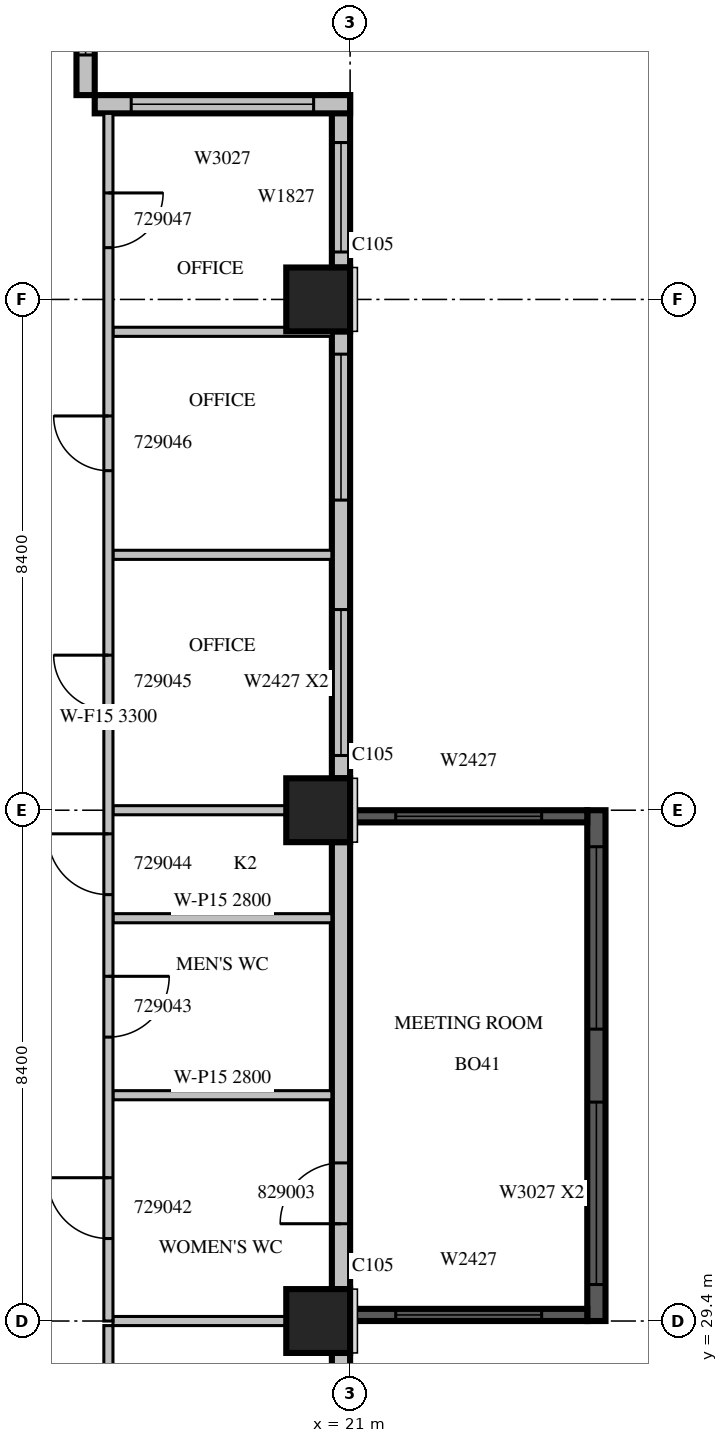
"""IFC4 building model, lengths in metres.
Left out: names, types, materials, properties, quantities, classifications, styles, units other than length and angle.
Written with IfcOpenShell. Run it as: python <this file> out.ifc"""

import sys

from ifc_helpers import new_model, si_unit, direction, frame, frame_2d, origin, origin_2d, place, context, subcontext, project, spatial, rectangle, extrude, source, transform, mapped, element, fill, save


model = new_model("IFC4")
c1 = context("Model", 3, precision=1e-05, world=origin(), true_north=direction((0.0, 1.0)))
c2 = subcontext(c1, "Body", "Model", "MODEL_VIEW")
j1 = project(units=[si_unit("LENGTHUNIT", "METRE"), si_unit("PLANEANGLEUNIT", "RADIAN")], contexts=[c1])
p1 = place(None, origin())
s1 = spatial("IfcSite", under=j1, at=p1, CompositionType="ELEMENT")
p2 = place(p1, origin())
s2 = spatial("IfcBuilding", under=s1, at=p2, CompositionType="ELEMENT")
p3 = place(p2, frame((0.0, 0.0, 132.9)))
s3 = spatial("IfcBuildingStorey", under=s2, at=p3, CompositionType="ELEMENT", Elevation=132.9)
m1 = source(origin(), c2, "Body", "SweptSolid", [
    extrude(rectangle(XDim=1.05, YDim=1.05, at=origin_2d()), origin(), (0.0, 0.0, 1.0), 4.2),
])
for number, where, z_axis, x_axis in (
    (1, (20.475, 29.4, 0.0), (0.0, 0.0, 1.0), (1.0, 0.0, 0.0)),
    (2, (20.475, 37.8, 0.0), (0.0, 0.0, 1.0), (1.0, 0.0, 0.0)),
    (3, (20.475, 46.2, 0.0), (0.0, 0.0, 1.0), (1.0, 0.0, 0.0)),
):
    element("IfcColumn", number, at=place(p3, frame(where, z_axis=z_axis, x_axis=x_axis)), inside=s3, PredefinedType="COLUMN", context=c2, shape_type="MappedRepresentation", body=[
        mapped(m1, transform((0.0, 0.0, 0.0), scale=1.0)),
    ])
m2 = source(origin(), c2, "Body", "SweptSolid", [
    extrude(rectangle(XDim=6.875, YDim=0.3, at=frame_2d((3.438, 0.0))), origin(), (0.0, 0.0, 1.0), 3.8),
])
p4 = place(p3, frame((20.85, 22.0, 0.0), z_axis=(0.0, 0.0, 1.0), x_axis=(0.0, 1.0, 0.0)))
e4 = element("IfcWall", 4, at=p4, inside=s3, PredefinedType="STANDARD", context=c2, shape_type="MappedRepresentation", body=[
    mapped(m2, transform((0.0, 0.0, 0.0), scale=1.0)),
])
m3 = source(origin(), c2, "Body", "SweptSolid", [
    extrude(rectangle(XDim=1.8, YDim=2.7, at=frame_2d((0.9, 1.35))), frame((0.0, 0.16, 0.0), z_axis=(0.0, -1.0, 0.0), x_axis=(1.0, 0.0, 0.0)), (0.0, 0.0, 1.0), 0.32),
])
p5 = place(p4, frame((0.2, 0.0, 0.6)))
e5 = element("IfcOpeningElement", 5, at=p5, cuts=e4, PredefinedType="OPENING", context=c2, shape_type="MappedRepresentation", body=[
    mapped(m3, transform((0.0, 0.0, 0.0), scale=1.0)),
])
p6 = place(p4, frame((4.537, 0.0, 0.6)))
e6 = element("IfcOpeningElement", 6, at=p6, cuts=e4, PredefinedType="OPENING", context=c2, shape_type="MappedRepresentation", body=[
    mapped(m3, transform((0.0, 0.0, 0.0), scale=1.0)),
])
m4 = source(origin(), c2, "Body", "SweptSolid", [
    extrude(rectangle(XDim=7.35, YDim=0.3, at=frame_2d((3.675, 0.0))), origin(), (0.0, 0.0, 1.0), 3.8),
])
p7 = place(p3, frame((20.85, 29.925, 0.0), z_axis=(0.0, 0.0, 1.0), x_axis=(0.0, 1.0, 0.0)))
e7 = element("IfcWall", 7, at=p7, inside=s3, PredefinedType="STANDARD", context=c2, shape_type="MappedRepresentation", body=[
    mapped(m4, transform((0.0, 0.0, 0.0), scale=1.0)),
])
m5 = source(origin(), c2, "Body", "SweptSolid", [
    extrude(rectangle(XDim=1.0, YDim=2.1, at=frame_2d((0.5, 1.05))), frame((0.0, 0.16, 0.0), z_axis=(0.0, -1.0, 0.0), x_axis=(1.0, 0.0, 0.0)), (0.0, 0.0, 1.0), 0.32),
])
p8 = place(p7, frame((1.075, 0.0, 0.0)))
e8 = element("IfcOpeningElement", 8, at=p8, cuts=e7, PredefinedType="OPENING", context=c2, shape_type="MappedRepresentation", body=[
    mapped(m5, transform((0.0, 0.0, 0.0), scale=1.0)),
])
p9 = place(p3, frame((20.85, 38.325, 0.0), z_axis=(0.0, 0.0, 1.0), x_axis=(0.0, 1.0, 0.0)))
e9 = element("IfcWall", 9, at=p9, inside=s3, PredefinedType="STANDARD", context=c2, shape_type="MappedRepresentation", body=[
    mapped(m4, transform((0.0, 0.0, 0.0), scale=1.0)),
])
m6 = source(origin(), c2, "Body", "SweptSolid", [
    extrude(rectangle(XDim=2.4, YDim=2.7, at=frame_2d((1.2, 1.35))), frame((0.0, 0.16, 0.0), z_axis=(0.0, -1.0, 0.0), x_axis=(1.0, 0.0, 0.0)), (0.0, 0.0, 1.0), 0.32),
])
p10 = place(p9, frame((0.375, 0.0, 0.6)))
e10 = element("IfcOpeningElement", 10, at=p10, cuts=e9, PredefinedType="OPENING", context=c2, shape_type="MappedRepresentation", body=[
    mapped(m6, transform((0.0, 0.0, 0.0), scale=1.0)),
])
p11 = place(p9, frame((4.575, 0.0, 0.6)))
e11 = element("IfcOpeningElement", 11, at=p11, cuts=e9, PredefinedType="OPENING", context=c2, shape_type="MappedRepresentation", body=[
    mapped(m6, transform((0.0, 0.0, 0.0), scale=1.0)),
])
m7 = source(origin(), c2, "Body", "SweptSolid", [
    extrude(rectangle(XDim=2.835, YDim=0.3, at=frame_2d((1.417, 0.0))), origin(), (0.0, 0.0, 1.0), 3.8),
])
p12 = place(p3, frame((20.85, 46.725, 0.0), z_axis=(0.0, 0.0, 1.0), x_axis=(0.0, 1.0, 0.0)))
e12 = element("IfcWall", 12, at=p12, inside=s3, PredefinedType="STANDARD", context=c2, shape_type="MappedRepresentation", body=[
    mapped(m7, transform((0.0, 0.0, 0.0), scale=1.0)),
])
p13 = place(p12, frame((0.255, 0.0, 0.6)))
e13 = element("IfcOpeningElement", 13, at=p13, cuts=e12, PredefinedType="OPENING", context=c2, shape_type="MappedRepresentation", body=[
    mapped(m3, transform((0.0, 0.0, 0.0), scale=1.0)),
])
m8 = source(origin(), c2, "Body", "SweptSolid", [
    extrude(rectangle(XDim=4.2, YDim=0.3, at=frame_2d((2.1, 0.0))), origin(), (0.0, 0.0, 1.0), 3.8),
])
p14 = place(p3, frame((21.0, 49.41, 0.0), z_axis=(0.0, 0.0, 1.0), x_axis=(-1.0, 0.0, 0.0)))
e14 = element("IfcWall", 14, at=p14, inside=s3, PredefinedType="STANDARD", context=c2, shape_type="MappedRepresentation", body=[
    mapped(m8, transform((0.0, 0.0, 0.0), scale=1.0)),
])
m9 = source(origin(), c2, "Body", "SweptSolid", [
    extrude(rectangle(XDim=3.0, YDim=2.7, at=frame_2d((1.5, 1.35))), frame((0.0, 0.16, 0.0), z_axis=(0.0, -1.0, 0.0), x_axis=(1.0, 0.0, 0.0)), (0.0, 0.0, 1.0), 0.32),
])
p15 = place(p14, frame((0.6, 0.0, 0.6)))
e15 = element("IfcOpeningElement", 15, at=p15, cuts=e14, PredefinedType="OPENING", context=c2, shape_type="MappedRepresentation", body=[
    mapped(m9, transform((0.0, 0.0, 0.0), scale=1.0)),
])
m10 = source(origin(), c2, "Body", "SweptSolid", [
    extrude(rectangle(XDim=2.52, YDim=0.3, at=frame_2d((1.26, 0.0))), origin(), (0.0, 0.0, 1.0), 3.8),
])
p16 = place(p3, frame((16.65, 49.56, 0.0), z_axis=(0.0, 0.0, 1.0), x_axis=(0.0, 1.0, 0.0)))
e16 = element("IfcWall", 16, at=p16, inside=s3, PredefinedType="STANDARD", context=c2, shape_type="MappedRepresentation", body=[
    mapped(m10, transform((0.0, 0.0, 0.0), scale=1.0)),
])
m11 = source(origin(), c2, "Body", "SweptSolid", [
    extrude(rectangle(XDim=1.2, YDim=2.7, at=frame_2d((0.6, 1.35))), frame((0.0, 0.16, 0.0), z_axis=(0.0, -1.0, 0.0), x_axis=(1.0, 0.0, 0.0)), (0.0, 0.0, 1.0), 0.32),
])
p17 = place(p16, frame((0.66, 0.0, 0.6)))
e17 = element("IfcOpeningElement", 17, at=p17, cuts=e16, PredefinedType="OPENING", context=c2, shape_type="MappedRepresentation", body=[
    mapped(m11, transform((0.0, 0.0, 0.0), scale=1.0)),
])
m12 = source(origin(), c2, "Body", "SweptSolid", [
    extrude(rectangle(XDim=8.4, YDim=0.3, at=frame_2d((4.2, 0.0))), origin(), (0.0, 0.0, 1.0), 3.79),
])
p18 = place(p3, frame((25.05, 29.4, 0.0), z_axis=(0.0, 0.0, 1.0), x_axis=(0.0, 1.0, 0.0)))
e18 = element("IfcWall", 18, at=p18, inside=s3, PredefinedType="SOLIDWALL", context=c2, shape_type="MappedRepresentation", body=[
    mapped(m12, transform((0.0, 0.0, 0.0), scale=1.0)),
])
p19 = place(p18, frame((0.6, 0.0, 0.6)))
e19 = element("IfcOpeningElement", 19, at=p19, cuts=e18, PredefinedType="OPENING", context=c2, shape_type="MappedRepresentation", body=[
    mapped(m9, transform((0.0, 0.0, 0.0), scale=1.0)),
])
p20 = place(p18, frame((4.8, 0.0, 0.6)))
e20 = element("IfcOpeningElement", 20, at=p20, cuts=e18, PredefinedType="OPENING", context=c2, shape_type="MappedRepresentation", body=[
    mapped(m9, transform((0.0, 0.0, 0.0), scale=1.0)),
])
m13 = source(origin(), c2, "Body", "SweptSolid", [
    extrude(rectangle(XDim=3.9, YDim=0.2, at=frame_2d((1.95, 0.0))), origin(), (0.0, 0.0, 1.0), 3.79),
])
p21 = place(p3, frame((21.0, 29.5, 0.0), z_axis=(0.0, 0.0, 1.0), x_axis=(1.0, 0.0, 0.0)))
e21 = element("IfcWall", 21, at=p21, inside=s3, PredefinedType="SOLIDWALL", context=c2, shape_type="MappedRepresentation", body=[
    mapped(m13, transform((0.0, 0.0, 0.0), scale=1.0)),
])
m14 = source(origin(), c2, "Body", "SweptSolid", [
    extrude(rectangle(XDim=2.4, YDim=2.7, at=frame_2d((1.2, 1.35))), frame((0.0, 0.11, 0.0), z_axis=(0.0, -1.0, 0.0), x_axis=(1.0, 0.0, 0.0)), (0.0, 0.0, 1.0), 0.22),
])
p22 = place(p21, frame((0.75, 0.0, 0.6)))
e22 = element("IfcOpeningElement", 22, at=p22, cuts=e21, PredefinedType="OPENING", context=c2, shape_type="MappedRepresentation", body=[
    mapped(m14, transform((0.0, 0.0, 0.0), scale=1.0)),
])
p23 = place(p3, frame((21.0, 37.7, 0.0), z_axis=(0.0, 0.0, 1.0), x_axis=(1.0, 0.0, 0.0)))
e23 = element("IfcWall", 23, at=p23, inside=s3, PredefinedType="SOLIDWALL", context=c2, shape_type="MappedRepresentation", body=[
    mapped(m13, transform((0.0, 0.0, 0.0), scale=1.0)),
])
p24 = place(p23, frame((0.75, 0.0, 0.6)))
e24 = element("IfcOpeningElement", 24, at=p24, cuts=e23, PredefinedType="OPENING", context=c2, shape_type="MappedRepresentation", body=[
    mapped(m14, transform((0.0, 0.0, 0.0), scale=1.0)),
])
m15 = source(origin(), c2, "Body", "SweptSolid", [
    extrude(rectangle(XDim=3.05, YDim=0.15, at=frame_2d((1.525, 0.0))), origin(), (0.0, 0.0, 1.0), 3.8),
])
p25 = place(p3, frame((17.025, 29.325, 0.0), z_axis=(0.0, 0.0, 1.0), x_axis=(0.0, -1.0, 0.0)))
e25 = element("IfcWall", 25, at=p25, inside=s3, PredefinedType="PARTITIONING", context=c2, shape_type="MappedRepresentation", body=[
    mapped(m15, transform((0.0, 0.0, 0.0), scale=1.0)),
])
m16 = source(origin(), c2, "Body", "SweptSolid", [
    extrude(rectangle(XDim=2.851, YDim=0.15, at=frame_2d((1.425, 0.0))), origin(), (0.0, 0.0, 1.0), 3.8),
])
p26 = place(p3, frame((19.951, 29.4, 0.0), z_axis=(0.0, 0.0, 1.0), x_axis=(-1.0, 0.0, 0.0)))
e26 = element("IfcWall", 26, at=p26, inside=s3, PredefinedType="PARTITIONING", context=c2, shape_type="MappedRepresentation", body=[
    mapped(m16, transform((0.0, 0.0, 0.0), scale=1.0)),
])
m17 = source(origin(), c2, "Body", "SweptSolid", [
    extrude(rectangle(XDim=3.6, YDim=0.15, at=frame_2d((1.8, 0.0))), origin(), (0.0, 0.0, 1.0), 2.8),
])
for number, where, z_axis, x_axis in (
    (27, (17.1, 33.113, 0.0), (0.0, 0.0, 1.0), (1.0, 0.0, 0.0)),
    (28, (17.1, 36.024, 0.0), (0.0, 0.0, 1.0), (1.0, 0.0, 0.0)),
):
    element("IfcWall", number, at=place(p3, frame(where, z_axis=z_axis, x_axis=x_axis)), inside=s3, PredefinedType="PARTITIONING", context=c2, shape_type="MappedRepresentation", body=[
        mapped(m17, transform((0.0, 0.0, 0.0), scale=1.0)),
    ])
m18 = source(origin(), c2, "Body", "SweptSolid", [
    extrude(rectangle(XDim=3.6, YDim=0.15, at=frame_2d((1.8, 0.0))), origin(), (0.0, 0.0, 1.0), 3.8),
])
p27 = place(p3, frame((17.1, 45.667, 0.0), z_axis=(0.0, 0.0, 1.0), x_axis=(1.0, 0.0, 0.0)))
e29 = element("IfcWall", 29, at=p27, inside=s3, PredefinedType="PARTITIONING", context=c2, shape_type="MappedRepresentation", body=[
    mapped(m18, transform((0.0, 0.0, 0.0), scale=1.0)),
])
p28 = place(p3, frame((19.951, 37.8, 0.0), z_axis=(0.0, 0.0, 1.0), x_axis=(-1.0, 0.0, 0.0)))
e30 = element("IfcWall", 30, at=p28, inside=s3, PredefinedType="PARTITIONING", context=c2, shape_type="MappedRepresentation", body=[
    mapped(m16, transform((0.0, 0.0, 0.0), scale=1.0)),
])
p29 = place(p3, frame((20.7, 42.0, 0.0), z_axis=(0.0, 0.0, 1.0), x_axis=(-1.0, 0.0, 0.0)))
e31 = element("IfcWall", 31, at=p29, inside=s3, PredefinedType="PARTITIONING", context=c2, shape_type="MappedRepresentation", body=[
    mapped(m18, transform((0.0, 0.0, 0.0), scale=1.0)),
])
m19 = source(origin(), c2, "Body", "SweptSolid", [
    extrude(rectangle(XDim=19.86, YDim=0.15, at=frame_2d((9.93, 0.0))), origin(), (0.0, 0.0, 1.0), 3.3),
])
p30 = place(p3, frame((17.025, 49.26, 0.0), z_axis=(0.0, 0.0, 1.0), x_axis=(0.0, -1.0, 0.0)))
e32 = element("IfcWall", 32, at=p30, inside=s3, PredefinedType="PARTITIONING", context=c2, shape_type="MappedRepresentation", body=[
    mapped(m19, transform((0.0, 0.0, 0.0), scale=1.0)),
])
m20 = source(origin(), c2, "Body", "SweptSolid", [
    extrude(rectangle(XDim=1.0, YDim=2.1, at=frame_2d((0.5, 1.05))), frame((0.0, 0.085, 0.0), z_axis=(0.0, -1.0, 0.0), x_axis=(1.0, 0.0, 0.0)), (0.0, 0.0, 1.0), 0.17),
])
p31 = place(p30, frame((17.503, 0.0, 0.0)))
e33 = element("IfcOpeningElement", 33, at=p31, cuts=e32, PredefinedType="OPENING", context=c2, shape_type="MappedRepresentation", body=[
    mapped(m20, transform((0.0, 0.0, 0.0), scale=1.0)),
])
p32 = place(p30, frame((14.191, 0.0, 0.0)))
e34 = element("IfcOpeningElement", 34, at=p32, cuts=e32, PredefinedType="OPENING", context=c2, shape_type="MappedRepresentation", body=[
    mapped(m20, transform((0.0, 0.0, 0.0), scale=1.0)),
])
p33 = place(p30, frame((11.848, 0.0, 0.0)))
e35 = element("IfcOpeningElement", 35, at=p33, cuts=e32, PredefinedType="OPENING", context=c2, shape_type="MappedRepresentation", body=[
    mapped(m20, transform((0.0, 0.0, 0.0), scale=1.0)),
])
m21 = source(origin(), c2, "Body", "SweptSolid", [
    extrude(rectangle(XDim=0.9, YDim=2.1, at=frame_2d((0.45, 1.05))), frame((0.0, 0.085, 0.0), z_axis=(0.0, -1.0, 0.0), x_axis=(1.0, 0.0, 0.0)), (0.0, 0.0, 1.0), 0.17),
])
p34 = place(p30, frame((8.91, 0.0, 0.0)))
e36 = element("IfcOpeningElement", 36, at=p34, cuts=e32, PredefinedType="OPENING", context=c2, shape_type="MappedRepresentation", body=[
    mapped(m21, transform((0.0, 0.0, 0.0), scale=1.0)),
])
p35 = place(p30, frame((4.976, 0.0, 0.0)))
e37 = element("IfcOpeningElement", 37, at=p35, cuts=e32, PredefinedType="OPENING", context=c2, shape_type="MappedRepresentation", body=[
    mapped(m21, transform((0.0, 0.0, 0.0), scale=1.0)),
])
p36 = place(p30, frame((1.309, 0.0, 0.0)))
e38 = element("IfcOpeningElement", 38, at=p36, cuts=e32, PredefinedType="OPENING", context=c2, shape_type="MappedRepresentation", body=[
    mapped(m21, transform((0.0, 0.0, 0.0), scale=1.0)),
])
m22 = source(origin(), c2, "Body", "SweptSolid", [
    extrude(rectangle(XDim=2.4, YDim=2.7, at=frame_2d((1.2, 1.35))), frame((0.0, 0.03, 0.0), z_axis=(0.0, -1.0, 0.0), x_axis=(1.0, 0.0, 0.0)), (0.0, 0.0, 1.0), 0.06),
])
p37 = place(p10, origin())
e39 = element("IfcWindow", 39, at=p37, inside=s3, PartitioningType="SINGLE_PANEL", PredefinedType="WINDOW", context=c2, shape_type="MappedRepresentation", body=[
    mapped(m22, transform((0.0, 0.0, 0.0), scale=1.0)),
])
fill(e10, e39)
p38 = place(p11, origin())
e40 = element("IfcWindow", 40, at=p38, inside=s3, PartitioningType="SINGLE_PANEL", PredefinedType="WINDOW", context=c2, shape_type="MappedRepresentation", body=[
    mapped(m22, transform((0.0, 0.0, 0.0), scale=1.0)),
])
fill(e11, e40)
m23 = source(origin(), c2, "Body", "SweptSolid", [
    extrude(rectangle(XDim=1.8, YDim=2.7, at=frame_2d((0.9, 1.35))), frame((0.0, 0.03, 0.0), z_axis=(0.0, -1.0, 0.0), x_axis=(1.0, 0.0, 0.0)), (0.0, 0.0, 1.0), 0.06),
])
p39 = place(p13, origin())
e41 = element("IfcWindow", 41, at=p39, inside=s3, PartitioningType="SINGLE_PANEL", PredefinedType="WINDOW", context=c2, shape_type="MappedRepresentation", body=[
    mapped(m23, transform((0.0, 0.0, 0.0), scale=1.0)),
])
fill(e13, e41)
m24 = source(origin(), c2, "Body", "SweptSolid", [
    extrude(rectangle(XDim=3.0, YDim=2.7, at=frame_2d((1.5, 1.35))), frame((0.0, 0.03, 0.0), z_axis=(0.0, -1.0, 0.0), x_axis=(1.0, 0.0, 0.0)), (0.0, 0.0, 1.0), 0.06),
])
p40 = place(p15, origin())
e42 = element("IfcWindow", 42, at=p40, inside=s3, PartitioningType="SINGLE_PANEL", PredefinedType="WINDOW", context=c2, shape_type="MappedRepresentation", body=[
    mapped(m24, transform((0.0, 0.0, 0.0), scale=1.0)),
])
fill(e15, e42)
m25 = source(origin(), c2, "Body", "SweptSolid", [
    extrude(rectangle(XDim=1.2, YDim=2.7, at=frame_2d((0.6, 1.35))), frame((0.0, 0.03, 0.0), z_axis=(0.0, -1.0, 0.0), x_axis=(1.0, 0.0, 0.0)), (0.0, 0.0, 1.0), 0.06),
])
p41 = place(p17, origin())
e43 = element("IfcWindow", 43, at=p41, inside=s3, PartitioningType="SINGLE_PANEL", PredefinedType="WINDOW", context=c2, shape_type="MappedRepresentation", body=[
    mapped(m25, transform((0.0, 0.0, 0.0), scale=1.0)),
])
fill(e17, e43)
p42 = place(p19, origin())
e44 = element("IfcWindow", 44, at=p42, inside=s3, PartitioningType="SINGLE_PANEL", PredefinedType="WINDOW", context=c2, shape_type="MappedRepresentation", body=[
    mapped(m24, transform((0.0, 0.0, 0.0), scale=1.0)),
])
fill(e19, e44)
p43 = place(p20, origin())
e45 = element("IfcWindow", 45, at=p43, inside=s3, PartitioningType="SINGLE_PANEL", PredefinedType="WINDOW", context=c2, shape_type="MappedRepresentation", body=[
    mapped(m24, transform((0.0, 0.0, 0.0), scale=1.0)),
])
fill(e20, e45)
p44 = place(p22, origin())
e46 = element("IfcWindow", 46, at=p44, inside=s3, PartitioningType="SINGLE_PANEL", PredefinedType="WINDOW", context=c2, shape_type="MappedRepresentation", body=[
    mapped(m22, transform((0.0, 0.0, 0.0), scale=1.0)),
])
fill(e22, e46)
p45 = place(p24, origin())
e47 = element("IfcWindow", 47, at=p45, inside=s3, PartitioningType="SINGLE_PANEL", PredefinedType="WINDOW", context=c2, shape_type="MappedRepresentation", body=[
    mapped(m22, transform((0.0, 0.0, 0.0), scale=1.0)),
])
fill(e24, e47)
m26 = source(origin(), c2, "Body", "SweptSolid", [
    extrude(rectangle(XDim=1.0, YDim=2.1, at=frame_2d((0.5, 1.05))), frame((0.0, 0.025, 0.0), z_axis=(0.0, -1.0, 0.0), x_axis=(1.0, 0.0, 0.0)), (0.0, 0.0, 1.0), 0.05),
])
p46 = place(p31, origin())
e48 = element("IfcDoor", 48, at=p46, inside=s3, OperationType="SINGLE_SWING_RIGHT", PredefinedType="DOOR", context=c2, shape_type="MappedRepresentation", body=[
    mapped(m26, transform((0.0, 0.0, 0.0), scale=1.0)),
])
fill(e33, e48)
p47 = place(p32, origin())
e49 = element("IfcDoor", 49, at=p47, inside=s3, OperationType="SINGLE_SWING_LEFT", PredefinedType="DOOR", context=c2, shape_type="MappedRepresentation", body=[
    mapped(m26, transform((0.0, 0.0, 0.0), scale=1.0)),
])
fill(e34, e49)
p48 = place(p33, origin())
e50 = element("IfcDoor", 50, at=p48, inside=s3, OperationType="SINGLE_SWING_RIGHT", PredefinedType="DOOR", context=c2, shape_type="MappedRepresentation", body=[
    mapped(m26, transform((0.0, 0.0, 0.0), scale=1.0)),
])
fill(e35, e50)
m27 = source(origin(), c2, "Body", "SweptSolid", [
    extrude(rectangle(XDim=0.9, YDim=2.1, at=frame_2d((0.45, 1.05))), frame((0.0, 0.025, 0.0), z_axis=(0.0, -1.0, 0.0), x_axis=(1.0, 0.0, 0.0)), (0.0, 0.0, 1.0), 0.05),
])
p49 = place(p34, origin())
e51 = element("IfcDoor", 51, at=p49, inside=s3, OperationType="SINGLE_SWING_RIGHT", PredefinedType="DOOR", context=c2, shape_type="MappedRepresentation", body=[
    mapped(m27, transform((0.0, 0.0, 0.0), scale=1.0)),
])
fill(e36, e51)
p50 = place(p35, origin())
e52 = element("IfcDoor", 52, at=p50, inside=s3, OperationType="SINGLE_SWING_RIGHT", PredefinedType="DOOR", context=c2, shape_type="MappedRepresentation", body=[
    mapped(m27, transform((0.0, 0.0, 0.0), scale=1.0)),
])
fill(e37, e52)
p51 = place(p36, origin())
e53 = element("IfcDoor", 53, at=p51, inside=s3, OperationType="SINGLE_SWING_LEFT", PredefinedType="DOOR", context=c2, shape_type="MappedRepresentation", body=[
    mapped(m27, transform((0.0, 0.0, 0.0), scale=1.0)),
])
fill(e38, e53)
p52 = place(p8, origin())
e54 = element("IfcDoor", 54, at=p52, inside=s3, OperationType="SINGLE_SWING_LEFT", PredefinedType="DOOR", context=c2, shape_type="MappedRepresentation", body=[
    mapped(m26, transform((0.0, 0.0, 0.0), scale=1.0)),
])
fill(e8, e54)
save(model, sys.argv[1])
